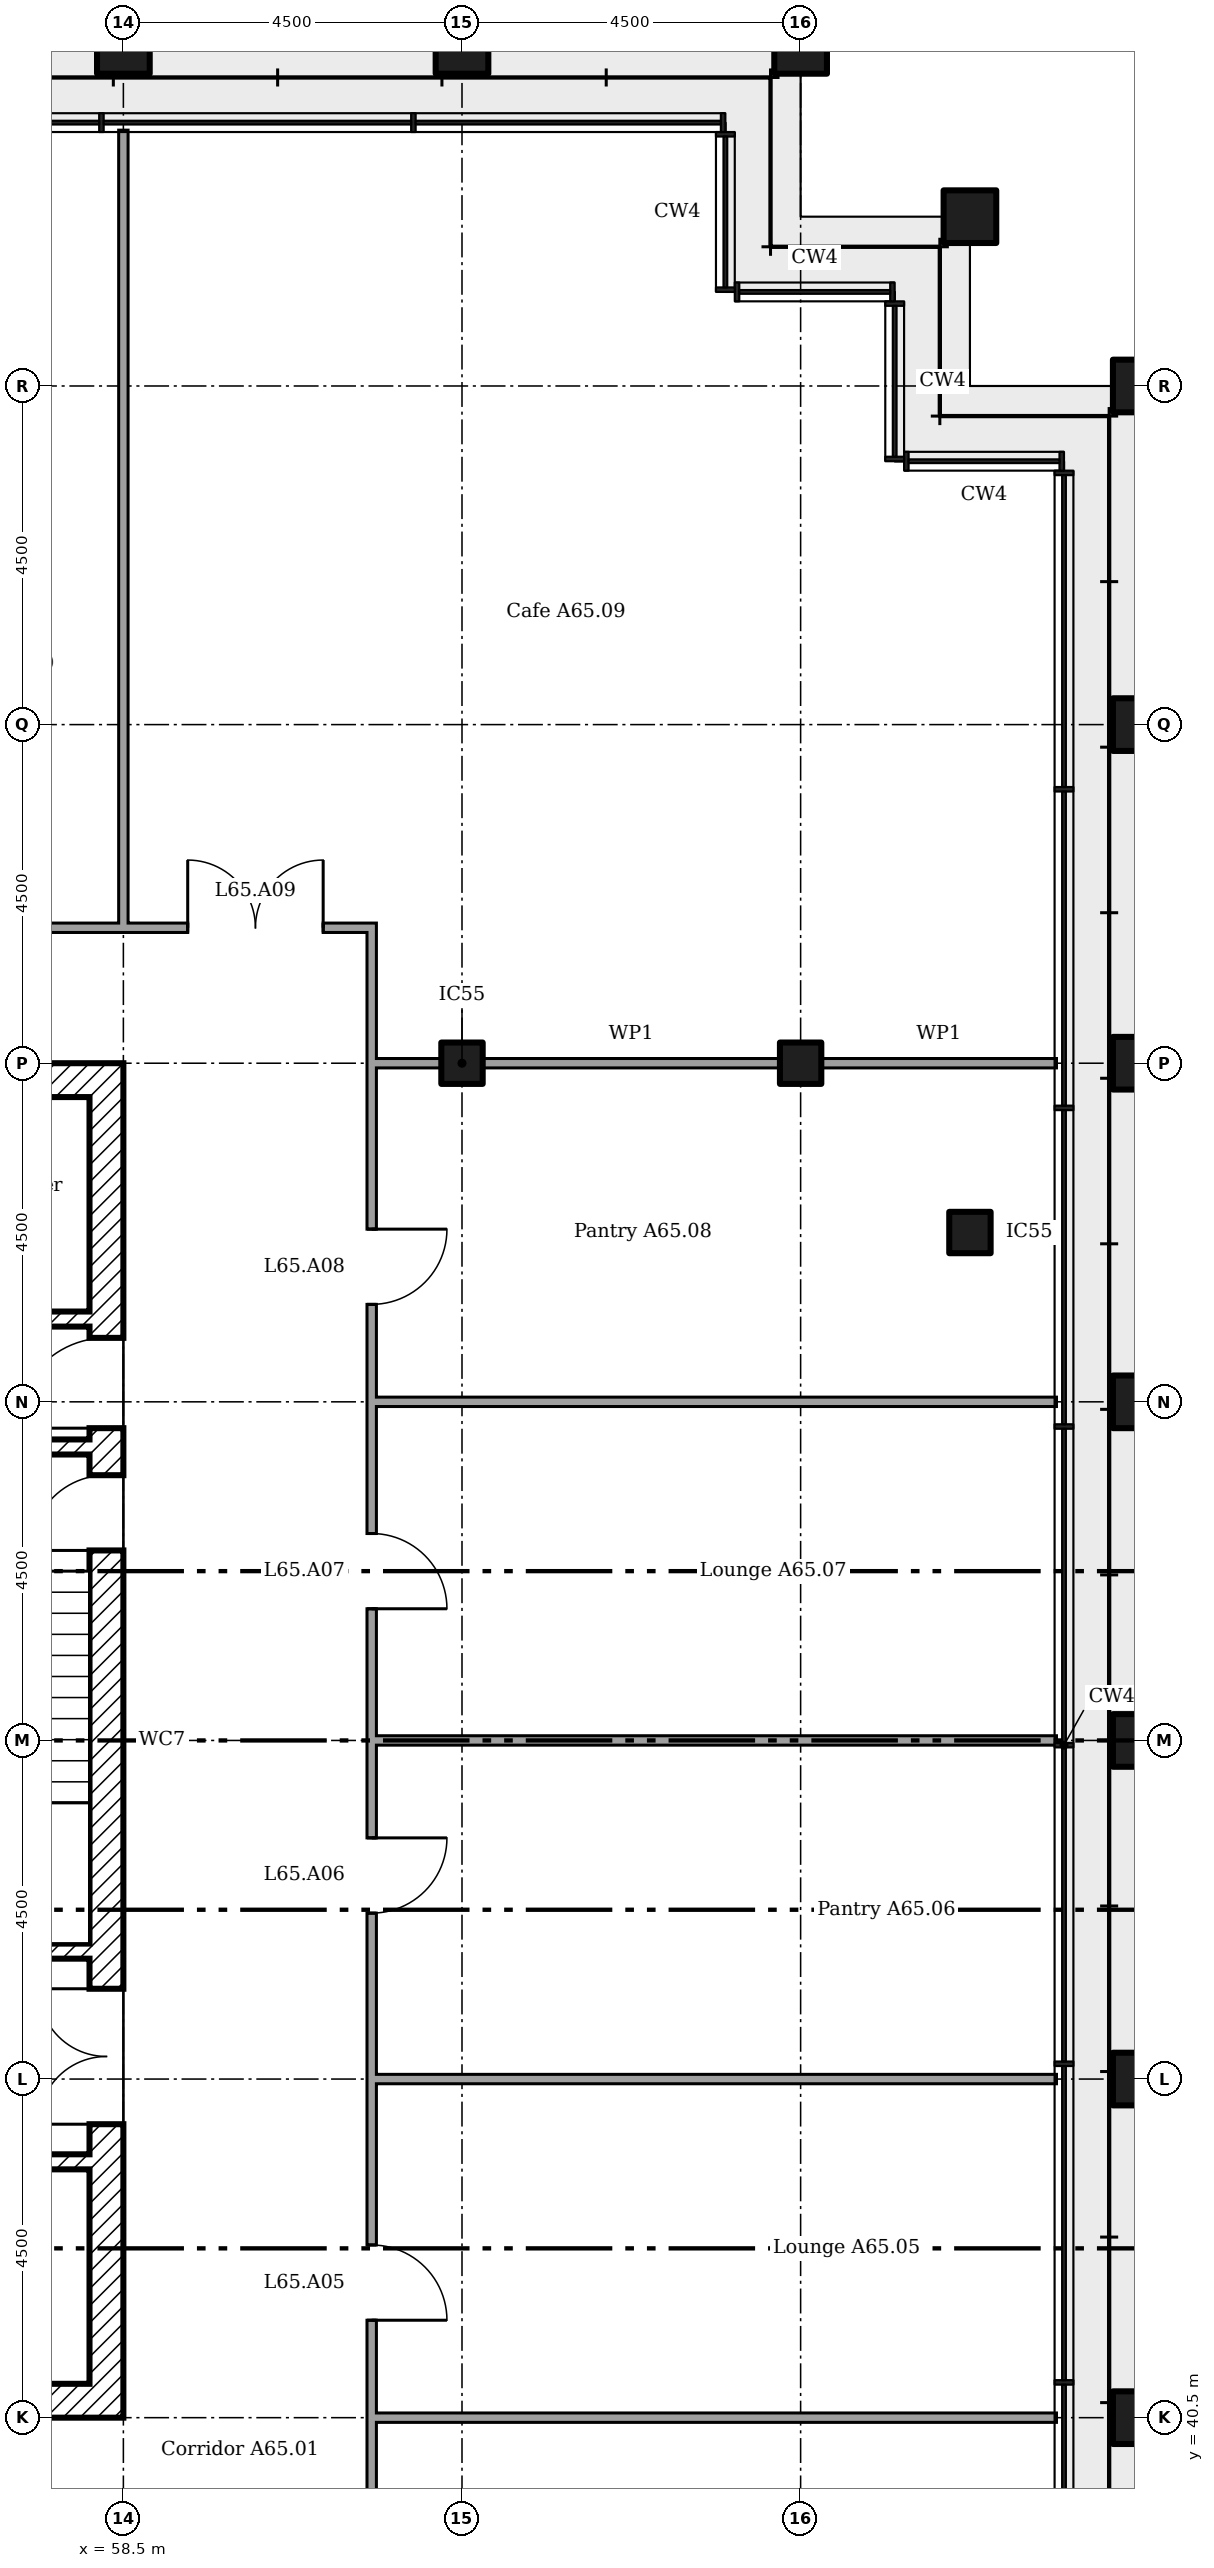
"""IFC4 building model, lengths in metres.
Left out: names, types, materials, properties, quantities, classifications, styles, units other than length and angle.
Written with IfcOpenShell. Run it as: python <this file> out.ifc"""

import sys

from ifc_helpers import new_model, si_unit, direction, frame, frame_2d, origin, origin_2d, place, context, subcontext, project, spatial, rectangle, extrude, element, fill, save


model = new_model("IFC4")
c1 = context("Model", 3, precision=1e-05, world=origin(), true_north=direction((0.0, 1.0)))
c2 = subcontext(c1, "Body", "Model", "MODEL_VIEW")
j1 = project(units=[si_unit("LENGTHUNIT", "METRE"), si_unit("PLANEANGLEUNIT", "RADIAN")], contexts=[c1])
p1 = place(None, origin())
s1 = spatial("IfcSite", under=j1, at=p1, CompositionType="ELEMENT")
p2 = place(p1, origin())
s2 = spatial("IfcBuilding", under=s1, at=p2, CompositionType="ELEMENT")
p3 = place(p2, frame((0.0, 0.0, 255.2)))
s3 = spatial("IfcBuildingStorey", under=s2, at=p3, CompositionType="ELEMENT", Elevation=255.2)
for number, where in (
    (1, (72.0, 40.5, 0.0)),
    (2, (72.0, 45.0, 0.0)),
    (3, (72.0, 49.5, 0.0)),
    (4, (72.0, 54.0, 0.0)),
    (5, (72.0, 58.5, 0.0)),
    (6, (72.0, 63.0, 0.0)),
    (7, (72.0, 67.5, 0.0)),
    (8, (69.75, 69.75, 0.0)),
    (9, (67.5, 72.0, 0.0)),
    (10, (63.0, 72.0, 0.0)),
    (11, (58.5, 72.0, 0.0)),
):
    element("IfcColumn", number, at=place(p3, frame(where)), inside=s3, PredefinedType="COLUMN", context=c2, shape_type="SweptSolid", body=[
        extrude(rectangle(XDim=0.7, YDim=0.7, at=origin_2d()), origin(), (0.0, 0.0, 1.0), 4.2),
    ])
for number, where in (
    (12, (63.0, 58.5, 0.0)),
    (13, (67.5, 58.5, 0.0)),
    (14, (69.75, 56.25, 0.0)),
):
    element("IfcColumn", number, at=place(p3, frame(where)), inside=s3, PredefinedType="COLUMN", context=c2, shape_type="SweptSolid", body=[
        extrude(rectangle(XDim=0.55, YDim=0.55, at=origin_2d()), origin(), (0.0, 0.0, 1.0), 4.2),
    ])
p4 = place(p3, frame((58.275, 40.5, 0.0), z_axis=(0.0, 0.0, 1.0), x_axis=(0.0, 1.0, 0.0)))
e15 = element("IfcWall", 15, at=p4, inside=s3, PredefinedType="SHEAR", context=c2, shape_type="SweptSolid", body=[
    extrude(rectangle(XDim=18.0, YDim=0.45, at=frame_2d((9.0, 0.0))), origin(), (0.0, 0.0, 1.0), 3.78),
])
p5 = place(p4, frame((13.15, 0.0, 0.0)))
e16 = element("IfcOpeningElement", 16, at=p5, cuts=e15, PredefinedType="OPENING", context=c2, shape_type="SweptSolid", body=[
    extrude(rectangle(XDim=1.2, YDim=2.1, at=frame_2d((0.6, 1.05))), frame((0.0, 0.235, 0.0), z_axis=(0.0, -1.0, 0.0), x_axis=(1.0, 0.0, 0.0)), (0.0, 0.0, 1.0), 0.47),
])
p6 = place(p4, frame((3.9, 0.0, 0.0)))
e17 = element("IfcOpeningElement", 17, at=p6, cuts=e15, PredefinedType="OPENING", context=c2, shape_type="SweptSolid", body=[
    extrude(rectangle(XDim=1.8, YDim=2.1, at=frame_2d((0.9, 1.05))), frame((0.0, 0.235, 0.0), z_axis=(0.0, -1.0, 0.0), x_axis=(1.0, 0.0, 0.0)), (0.0, 0.0, 1.0), 0.47),
])
p7 = place(p4, frame((11.525, 0.0, 0.0)))
e18 = element("IfcOpeningElement", 18, at=p7, cuts=e15, PredefinedType="OPENING", context=c2, shape_type="SweptSolid", body=[
    extrude(rectangle(XDim=1.0, YDim=2.1, at=frame_2d((0.5, 1.05))), frame((0.0, 0.235, 0.0), z_axis=(0.0, -1.0, 0.0), x_axis=(1.0, 0.0, 0.0)), (0.0, 0.0, 1.0), 0.47),
])
for number, where in (
    (19, (40.5, 58.275, 0.0)),
    (20, (40.5, 40.725, 0.0)),
):
    element("IfcWall", number, at=place(p3, frame(where)), inside=s3, PredefinedType="SHEAR", context=c2, shape_type="SweptSolid", body=[
        extrude(rectangle(XDim=17.55, YDim=0.45, at=frame_2d((8.775, 0.0))), origin(), (0.0, 0.0, 1.0), 3.78),
    ])
p8 = place(p3, frame((46.933, 55.1, 0.0)))
e21 = element("IfcWall", 21, at=p8, inside=s3, PredefinedType="SHEAR", context=c2, shape_type="SweptSolid", body=[
    extrude(rectangle(XDim=11.117, YDim=0.2, at=frame_2d((5.558, 0.0))), origin(), (0.0, 0.0, 1.0), 3.78),
])
p9 = place(p8, frame((8.833, 0.0, 0.0)))
e22 = element("IfcOpeningElement", 22, at=p9, cuts=e21, PredefinedType="OPENING", context=c2, shape_type="SweptSolid", body=[
    extrude(rectangle(XDim=0.9, YDim=2.1, at=frame_2d((0.45, 1.05))), frame((0.0, 0.11, 0.0), z_axis=(0.0, -1.0, 0.0), x_axis=(1.0, 0.0, 0.0)), (0.0, 0.0, 1.0), 0.22),
])
p10 = place(p8, frame((0.633, 0.0, 0.0)))
e23 = element("IfcOpeningElement", 23, at=p10, cuts=e21, PredefinedType="OPENING", context=c2, shape_type="SweptSolid", body=[
    extrude(rectangle(XDim=1.2, YDim=2.1, at=frame_2d((0.6, 1.05))), frame((0.0, 0.11, 0.0), z_axis=(0.0, -1.0, 0.0), x_axis=(1.0, 0.0, 0.0)), (0.0, 0.0, 1.0), 0.22),
])
p11 = place(p8, frame((3.3, 0.0, 0.0)))
e24 = element("IfcOpeningElement", 24, at=p11, cuts=e21, PredefinedType="OPENING", context=c2, shape_type="SweptSolid", body=[
    extrude(rectangle(XDim=1.2, YDim=2.1, at=frame_2d((0.6, 1.05))), frame((0.0, 0.11, 0.0), z_axis=(0.0, -1.0, 0.0), x_axis=(1.0, 0.0, 0.0)), (0.0, 0.0, 1.0), 0.22),
])
p12 = place(p8, frame((5.967, 0.0, 0.0)))
e25 = element("IfcOpeningElement", 25, at=p12, cuts=e21, PredefinedType="OPENING", context=c2, shape_type="SweptSolid", body=[
    extrude(rectangle(XDim=1.2, YDim=2.1, at=frame_2d((0.6, 1.05))), frame((0.0, 0.11, 0.0), z_axis=(0.0, -1.0, 0.0), x_axis=(1.0, 0.0, 0.0)), (0.0, 0.0, 1.0), 0.22),
])
p13 = place(p3, frame((40.95, 43.9, 0.0)))
e26 = element("IfcWall", 26, at=p13, inside=s3, PredefinedType="SHEAR", context=c2, shape_type="SweptSolid", body=[
    extrude(rectangle(XDim=17.1, YDim=0.2, at=frame_2d((8.55, 0.0))), origin(), (0.0, 0.0, 1.0), 3.78),
])
p14 = place(p13, frame((1.433, 0.0, 0.0)))
e27 = element("IfcOpeningElement", 27, at=p14, cuts=e26, PredefinedType="OPENING", context=c2, shape_type="SweptSolid", body=[
    extrude(rectangle(XDim=0.9, YDim=2.1, at=frame_2d((0.45, 1.05))), frame((0.0, 0.11, 0.0), z_axis=(0.0, -1.0, 0.0), x_axis=(1.0, 0.0, 0.0)), (0.0, 0.0, 1.0), 0.22),
])
p15 = place(p13, frame((4.1, 0.0, 0.0)))
e28 = element("IfcOpeningElement", 28, at=p15, cuts=e26, PredefinedType="OPENING", context=c2, shape_type="SweptSolid", body=[
    extrude(rectangle(XDim=0.9, YDim=2.1, at=frame_2d((0.45, 1.05))), frame((0.0, 0.11, 0.0), z_axis=(0.0, -1.0, 0.0), x_axis=(1.0, 0.0, 0.0)), (0.0, 0.0, 1.0), 0.22),
])
p16 = place(p13, frame((6.767, 0.0, 0.0)))
e29 = element("IfcOpeningElement", 29, at=p16, cuts=e26, PredefinedType="OPENING", context=c2, shape_type="SweptSolid", body=[
    extrude(rectangle(XDim=0.9, YDim=2.1, at=frame_2d((0.45, 1.05))), frame((0.0, 0.11, 0.0), z_axis=(0.0, -1.0, 0.0), x_axis=(1.0, 0.0, 0.0)), (0.0, 0.0, 1.0), 0.22),
])
p17 = place(p13, frame((9.433, 0.0, 0.0)))
e30 = element("IfcOpeningElement", 30, at=p17, cuts=e26, PredefinedType="OPENING", context=c2, shape_type="SweptSolid", body=[
    extrude(rectangle(XDim=0.9, YDim=2.1, at=frame_2d((0.45, 1.05))), frame((0.0, 0.11, 0.0), z_axis=(0.0, -1.0, 0.0), x_axis=(1.0, 0.0, 0.0)), (0.0, 0.0, 1.0), 0.22),
])
p18 = place(p13, frame((12.1, 0.0, 0.0)))
e31 = element("IfcOpeningElement", 31, at=p18, cuts=e26, PredefinedType="OPENING", context=c2, shape_type="SweptSolid", body=[
    extrude(rectangle(XDim=0.9, YDim=2.1, at=frame_2d((0.45, 1.05))), frame((0.0, 0.11, 0.0), z_axis=(0.0, -1.0, 0.0), x_axis=(1.0, 0.0, 0.0)), (0.0, 0.0, 1.0), 0.22),
])
p19 = place(p3, frame((54.52, 53.4, 0.0)))
e32 = element("IfcWall", 32, at=p19, inside=s3, PredefinedType="SHEAR", context=c2, shape_type="SweptSolid", body=[
    extrude(rectangle(XDim=3.53, YDim=0.2, at=frame_2d((1.765, 0.0))), origin(), (0.0, 0.0, 1.0), 3.78),
])
p20 = place(p19, frame((1.09, 0.0, 0.0)))
e33 = element("IfcOpeningElement", 33, at=p20, cuts=e32, PredefinedType="OPENING", context=c2, shape_type="SweptSolid", body=[
    extrude(rectangle(XDim=1.0, YDim=2.1, at=frame_2d((0.5, 1.05))), frame((0.0, 0.11, 0.0), z_axis=(0.0, -1.0, 0.0), x_axis=(1.0, 0.0, 0.0)), (0.0, 0.0, 1.0), 0.22),
])
p21 = place(p3, frame((54.52, 46.7, 0.0)))
e34 = element("IfcWall", 34, at=p21, inside=s3, PredefinedType="SHEAR", context=c2, shape_type="SweptSolid", body=[
    extrude(rectangle(XDim=3.53, YDim=0.2, at=frame_2d((1.765, 0.0))), origin(), (0.0, 0.0, 1.0), 3.78),
])
for number, where in (
    (35, (61.8, 40.5, 0.0)),
    (36, (61.8, 45.0, 0.0)),
    (37, (61.8, 49.5, 0.0)),
    (38, (61.8, 54.0, 0.0)),
):
    element("IfcWall", number, at=place(p3, frame(where)), inside=s3, PredefinedType="PARTITIONING", context=c2, shape_type="SweptSolid", body=[
        extrude(rectangle(XDim=9.1, YDim=0.125, at=frame_2d((4.55, 0.0))), origin(), (0.0, 0.0, 1.0), 3.341),
    ])
p22 = place(p3, frame((61.8, 58.5, 0.0)))
e39 = element("IfcWall", 39, at=p22, inside=s3, PredefinedType="PARTITIONING", context=c2, shape_type="SweptSolid", body=[
    extrude(rectangle(XDim=0.925, YDim=0.125, at=frame_2d((0.462, 0.0))), origin(), (0.0, 0.0, 1.0), 3.251),
])
p23 = place(p3, frame((63.275, 58.5, 0.0)))
e40 = element("IfcWall", 40, at=p23, inside=s3, PredefinedType="PARTITIONING", context=c2, shape_type="SweptSolid", body=[
    extrude(rectangle(XDim=3.95, YDim=0.125, at=frame_2d((1.975, 0.0))), origin(), (0.0, 0.0, 1.0), 3.251),
])
p24 = place(p3, frame((67.775, 58.5, 0.0)))
e41 = element("IfcWall", 41, at=p24, inside=s3, PredefinedType="PARTITIONING", context=c2, shape_type="SweptSolid", body=[
    extrude(rectangle(XDim=3.125, YDim=0.125, at=frame_2d((1.562, 0.0))), origin(), (0.0, 0.0, 1.0), 3.251),
])
p25 = place(p3, frame((41.6, 60.3, 0.0)))
e42 = element("IfcWall", 42, at=p25, inside=s3, PredefinedType="PARTITIONING", context=c2, shape_type="SweptSolid", body=[
    extrude(rectangle(XDim=20.262, YDim=0.125, at=frame_2d((10.131, 0.0))), origin(), (0.0, 0.0, 1.0), 4.025),
])
p26 = place(p25, frame((17.755, 0.0, 0.0)))
e43 = element("IfcOpeningElement", 43, at=p26, cuts=e42, PredefinedType="OPENING", context=c2, shape_type="SweptSolid", body=[
    extrude(rectangle(XDim=1.8, YDim=2.1, at=frame_2d((0.9, 1.05))), frame((0.0, 0.073, 0.0), z_axis=(0.0, -1.0, 0.0), x_axis=(1.0, 0.0, 0.0)), (0.0, 0.0, 1.0), 0.145),
])
p27 = place(p25, frame((14.15, 0.0, 0.0)))
e44 = element("IfcOpeningElement", 44, at=p27, cuts=e42, PredefinedType="OPENING", context=c2, shape_type="SweptSolid", body=[
    extrude(rectangle(XDim=1.0, YDim=2.1, at=frame_2d((0.5, 1.05))), frame((0.0, 0.073, 0.0), z_axis=(0.0, -1.0, 0.0), x_axis=(1.0, 0.0, 0.0)), (0.0, 0.0, 1.0), 0.145),
])
p28 = place(p25, frame((9.195, 0.0, 0.0)))
e45 = element("IfcOpeningElement", 45, at=p28, cuts=e42, PredefinedType="OPENING", context=c2, shape_type="SweptSolid", body=[
    extrude(rectangle(XDim=1.0, YDim=2.1, at=frame_2d((0.5, 1.05))), frame((0.0, 0.073, 0.0), z_axis=(0.0, -1.0, 0.0), x_axis=(1.0, 0.0, 0.0)), (0.0, 0.0, 1.0), 0.145),
])
p29 = place(p25, frame((4.5, 0.0, 0.0)))
e46 = element("IfcOpeningElement", 46, at=p29, cuts=e42, PredefinedType="OPENING", context=c2, shape_type="SweptSolid", body=[
    extrude(rectangle(XDim=1.0, YDim=2.1, at=frame_2d((0.5, 1.05))), frame((0.0, 0.073, 0.0), z_axis=(0.0, -1.0, 0.0), x_axis=(1.0, 0.0, 0.0)), (0.0, 0.0, 1.0), 0.145),
])
p30 = place(p3, frame((58.5, 60.3, 0.0), z_axis=(0.0, 0.0, 1.0), x_axis=(0.0, 1.0, 0.0)))
e47 = element("IfcWall", 47, at=p30, inside=s3, PredefinedType="PARTITIONING", context=c2, shape_type="SweptSolid", body=[
    extrude(rectangle(XDim=10.6, YDim=0.125, at=frame_2d((5.3, 0.0))), origin(), (0.0, 0.0, 1.0), 3.341),
])
p31 = place(p3, frame((61.8, 38.163, 0.0), z_axis=(0.0, 0.0, 1.0), x_axis=(0.0, 1.0, 0.0)))
e48 = element("IfcWall", 48, at=p31, inside=s3, PredefinedType="PARTITIONING", context=c2, shape_type="SweptSolid", body=[
    extrude(rectangle(XDim=22.075, YDim=0.125, at=frame_2d((11.038, 0.0))), origin(), (0.0, 0.0, 1.0), 4.025),
])
p32 = place(p31, frame((3.633, 0.0, 0.0)))
e49 = element("IfcOpeningElement", 49, at=p32, cuts=e48, PredefinedType="OPENING", context=c2, shape_type="SweptSolid", body=[
    extrude(rectangle(XDim=1.0, YDim=2.1, at=frame_2d((0.5, 1.05))), frame((0.0, 0.073, 0.0), z_axis=(0.0, -1.0, 0.0), x_axis=(1.0, 0.0, 0.0)), (0.0, 0.0, 1.0), 0.145),
])
p33 = place(p31, frame((9.042, 0.0, 0.0)))
e50 = element("IfcOpeningElement", 50, at=p33, cuts=e48, PredefinedType="OPENING", context=c2, shape_type="SweptSolid", body=[
    extrude(rectangle(XDim=1.0, YDim=2.1, at=frame_2d((0.5, 1.05))), frame((0.0, 0.073, 0.0), z_axis=(0.0, -1.0, 0.0), x_axis=(1.0, 0.0, 0.0)), (0.0, 0.0, 1.0), 0.145),
])
p34 = place(p31, frame((13.087, 0.0, 0.0)))
e51 = element("IfcOpeningElement", 51, at=p34, cuts=e48, PredefinedType="OPENING", context=c2, shape_type="SweptSolid", body=[
    extrude(rectangle(XDim=1.0, YDim=2.1, at=frame_2d((0.5, 1.05))), frame((0.0, 0.073, 0.0), z_axis=(0.0, -1.0, 0.0), x_axis=(1.0, 0.0, 0.0)), (0.0, 0.0, 1.0), 0.145),
])
p35 = place(p31, frame((17.133, 0.0, 0.0)))
e52 = element("IfcOpeningElement", 52, at=p35, cuts=e48, PredefinedType="OPENING", context=c2, shape_type="SweptSolid", body=[
    extrude(rectangle(XDim=1.0, YDim=2.1, at=frame_2d((0.5, 1.05))), frame((0.0, 0.073, 0.0), z_axis=(0.0, -1.0, 0.0), x_axis=(1.0, 0.0, 0.0)), (0.0, 0.0, 1.0), 0.145),
])
p36 = place(p5, origin())
e53 = element("IfcDoor", 53, at=p36, inside=s3, OperationType="SINGLE_SWING_RIGHT", PredefinedType="DOOR", context=c2, shape_type="SweptSolid", body=[
    extrude(rectangle(XDim=1.2, YDim=2.1, at=frame_2d((0.6, 1.05))), frame((0.0, 0.025, 0.0), z_axis=(0.0, -1.0, 0.0), x_axis=(1.0, 0.0, 0.0)), (0.0, 0.0, 1.0), 0.05),
])
fill(e16, e53)
p37 = place(p6, origin())
e54 = element("IfcDoor", 54, at=p37, inside=s3, OperationType="DOUBLE_DOOR_SINGLE_SWING", PredefinedType="DOOR", context=c2, shape_type="SweptSolid", body=[
    extrude(rectangle(XDim=1.8, YDim=2.1, at=frame_2d((0.9, 1.05))), frame((0.0, 0.025, 0.0), z_axis=(0.0, -1.0, 0.0), x_axis=(1.0, 0.0, 0.0)), (0.0, 0.0, 1.0), 0.05),
])
fill(e17, e54)
p38 = place(p7, origin())
e55 = element("IfcDoor", 55, at=p38, inside=s3, OperationType="SINGLE_SWING_RIGHT", PredefinedType="DOOR", context=c2, shape_type="SweptSolid", body=[
    extrude(rectangle(XDim=1.0, YDim=2.1, at=frame_2d((0.5, 1.05))), frame((0.0, 0.025, 0.0), z_axis=(0.0, -1.0, 0.0), x_axis=(1.0, 0.0, 0.0)), (0.0, 0.0, 1.0), 0.05),
])
fill(e18, e55)
p39 = place(p32, frame((1.0, 0.0, 0.0), x_axis=(-1.0, 0.0, 0.0)))
e56 = element("IfcDoor", 56, at=p39, inside=s3, OperationType="SINGLE_SWING_LEFT", PredefinedType="DOOR", context=c2, shape_type="SweptSolid", body=[
    extrude(rectangle(XDim=1.0, YDim=2.1, at=frame_2d((0.5, 1.05))), frame((0.0, 0.025, 0.0), z_axis=(0.0, -1.0, 0.0), x_axis=(1.0, 0.0, 0.0)), (0.0, 0.0, 1.0), 0.05),
])
fill(e49, e56)
p40 = place(p33, frame((1.0, 0.0, 0.0), x_axis=(-1.0, 0.0, 0.0)))
e57 = element("IfcDoor", 57, at=p40, inside=s3, OperationType="SINGLE_SWING_RIGHT", PredefinedType="DOOR", context=c2, shape_type="SweptSolid", body=[
    extrude(rectangle(XDim=1.0, YDim=2.1, at=frame_2d((0.5, 1.05))), frame((0.0, 0.025, 0.0), z_axis=(0.0, -1.0, 0.0), x_axis=(1.0, 0.0, 0.0)), (0.0, 0.0, 1.0), 0.05),
])
fill(e50, e57)
p41 = place(p34, frame((1.0, 0.0, 0.0), x_axis=(-1.0, 0.0, 0.0)))
e58 = element("IfcDoor", 58, at=p41, inside=s3, OperationType="SINGLE_SWING_LEFT", PredefinedType="DOOR", context=c2, shape_type="SweptSolid", body=[
    extrude(rectangle(XDim=1.0, YDim=2.1, at=frame_2d((0.5, 1.05))), frame((0.0, 0.025, 0.0), z_axis=(0.0, -1.0, 0.0), x_axis=(1.0, 0.0, 0.0)), (0.0, 0.0, 1.0), 0.05),
])
fill(e51, e58)
p42 = place(p35, frame((1.0, 0.0, 0.0), x_axis=(-1.0, 0.0, 0.0)))
e59 = element("IfcDoor", 59, at=p42, inside=s3, OperationType="SINGLE_SWING_RIGHT", PredefinedType="DOOR", context=c2, shape_type="SweptSolid", body=[
    extrude(rectangle(XDim=1.0, YDim=2.1, at=frame_2d((0.5, 1.05))), frame((0.0, 0.025, 0.0), z_axis=(0.0, -1.0, 0.0), x_axis=(1.0, 0.0, 0.0)), (0.0, 0.0, 1.0), 0.05),
])
fill(e52, e59)
p43 = place(p26, origin())
e60 = element("IfcDoor", 60, at=p43, inside=s3, OperationType="DOUBLE_DOOR_SINGLE_SWING", PredefinedType="DOOR", context=c2, shape_type="SweptSolid", body=[
    extrude(rectangle(XDim=1.8, YDim=2.1, at=frame_2d((0.9, 1.05))), frame((0.0, 0.025, 0.0), z_axis=(0.0, -1.0, 0.0), x_axis=(1.0, 0.0, 0.0)), (0.0, 0.0, 1.0), 0.05),
])
fill(e43, e60)
save(model, sys.argv[1])
